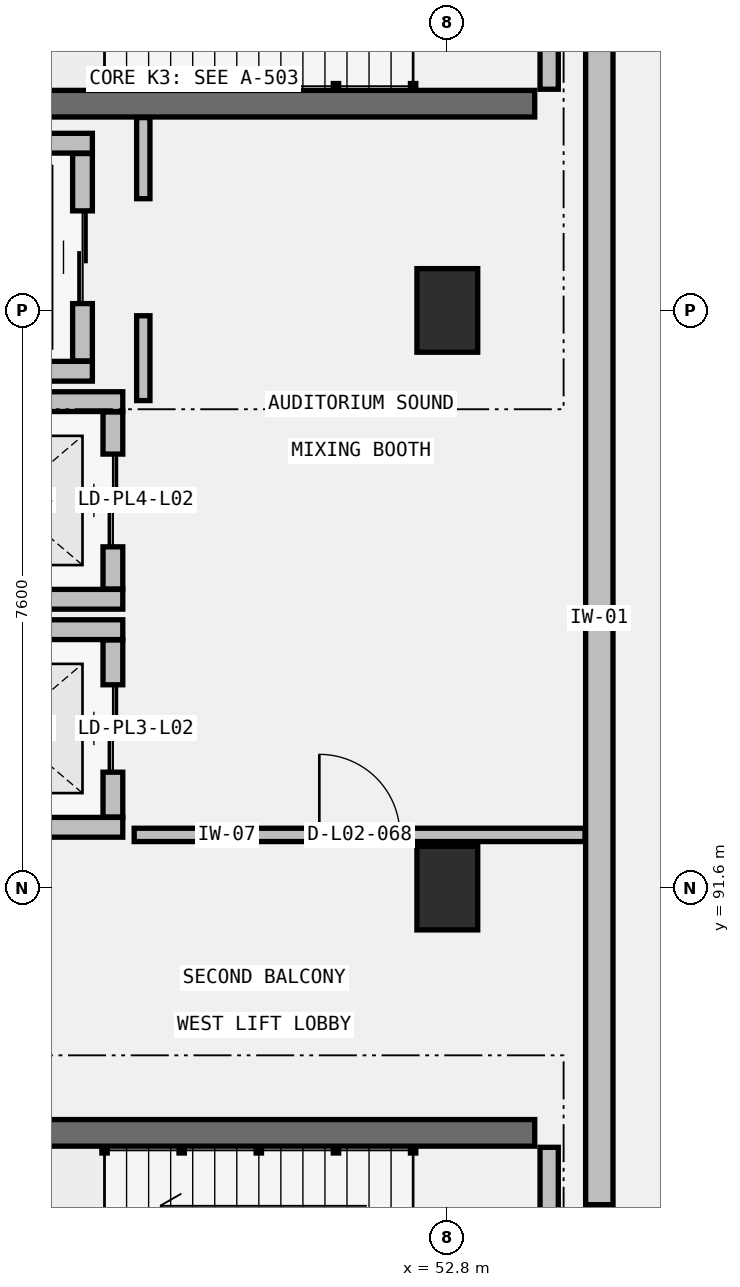
"""IFC4 building model, lengths in metres.
Left out: names, types, materials, properties, quantities, classifications, styles, units other than length and angle.
Written with IfcOpenShell. Run it as: python <this file> out.ifc"""

import sys

from ifc_helpers import new_model, si_unit, direction, frame, frame_2d, origin, origin_2d, place, context, subcontext, project, spatial, rectangle, extrude, element, fill, save


model = new_model("IFC4")
c1 = context("Model", 3, precision=1e-05, world=origin(), true_north=direction((0.0, 1.0)))
c2 = subcontext(c1, "Body", "Model", "MODEL_VIEW")
j1 = project(units=[si_unit("LENGTHUNIT", "METRE"), si_unit("PLANEANGLEUNIT", "RADIAN")], contexts=[c1])
p1 = place(None, origin())
s1 = spatial("IfcSite", under=j1, at=p1, CompositionType="ELEMENT")
p2 = place(p1, origin())
s2 = spatial("IfcBuilding", under=s1, at=p2, CompositionType="ELEMENT")
p3 = place(p2, frame((0.0, 0.0, 10.0)))
s3 = spatial("IfcBuildingStorey", under=s2, at=p3, CompositionType="ELEMENT", Elevation=10.0)
for number, where, z_axis, x_axis in (
    (1, (52.8, 91.6, 0.0), (0.0, 0.0, 1.0), (1.0, 0.0, 0.0)),
    (2, (52.8, 99.2, 0.0), (0.0, 0.0, 1.0), (1.0, 0.0, 0.0)),
):
    element("IfcColumn", number, at=place(p3, frame(where, z_axis=z_axis, x_axis=x_axis)), inside=s3, PredefinedType="COLUMN", context=c2, shape_type="SweptSolid", body=[
        extrude(rectangle(XDim=0.8, YDim=1.1, at=origin_2d()), origin(), (0.0, 0.0, 1.0), 4.6),
    ])
for number, where, z_axis, x_axis in (
    (3, (53.95, 88.38, 0.0), (0.0, 0.0, 1.0), (-1.0, 0.0, 0.0)),
    (4, (45.8, 101.92, 0.0), (0.0, 0.0, 1.0), (1.0, 0.0, 0.0)),
):
    element("IfcWall", number, at=place(p3, frame(where, z_axis=z_axis, x_axis=x_axis)), inside=s3, PredefinedType="SHEAR", context=c2, shape_type="SweptSolid", body=[
        extrude(rectangle(XDim=8.15, YDim=0.35, at=frame_2d((4.075, 0.0))), origin(), (0.0, 0.0, 1.0), 4.36),
    ])
p4 = place(p3, frame((54.14, 88.19, 0.0), z_axis=(0.0, 0.0, 1.0), x_axis=(0.0, -1.0, 0.0)))
e5 = element("IfcWall", 5, at=p4, inside=s3, PredefinedType="STANDARD", context=c2, shape_type="SweptSolid", body=[
    extrude(rectangle(XDim=3.28, YDim=0.24, at=frame_2d((1.64, 0.0))), origin(), (0.0, 0.0, 1.0), 4.36),
])
p5 = place(p4, frame((0.915, 0.0, 0.0)))
e6 = element("IfcOpeningElement", 6, at=p5, cuts=e5, PredefinedType="OPENING", context=c2, shape_type="SweptSolid", body=[
    extrude(rectangle(XDim=1.45, YDim=2.2, at=frame_2d((0.725, 1.1))), frame((0.0, 0.13, 0.0), z_axis=(0.0, -1.0, 0.0), x_axis=(1.0, 0.0, 0.0)), (0.0, 0.0, 1.0), 0.26),
])
p6 = place(p3, frame((54.14, 105.39, 0.0), z_axis=(0.0, 0.0, 1.0), x_axis=(0.0, -1.0, 0.0)))
e7 = element("IfcWall", 7, at=p6, inside=s3, PredefinedType="STANDARD", context=c2, shape_type="SweptSolid", body=[
    extrude(rectangle(XDim=3.28, YDim=0.24, at=frame_2d((1.64, 0.0))), origin(), (0.0, 0.0, 1.0), 4.36),
])
p7 = place(p6, frame((0.915, 0.0, 0.0)))
e8 = element("IfcOpeningElement", 8, at=p7, cuts=e7, PredefinedType="OPENING", context=c2, shape_type="SweptSolid", body=[
    extrude(rectangle(XDim=1.45, YDim=2.2, at=frame_2d((0.725, 1.1))), frame((0.0, 0.13, 0.0), z_axis=(0.0, -1.0, 0.0), x_axis=(1.0, 0.0, 0.0)), (0.0, 0.0, 1.0), 0.26),
])
for number, where, z_axis, x_axis in (
    (9, (45.47, 92.4, 0.0), (0.0, 0.0, 1.0), (1.0, 0.0, 0.0)),
    (10, (45.47, 95.0, 0.0), (0.0, 0.0, 1.0), (1.0, 0.0, 0.0)),
):
    element("IfcWall", number, at=place(p3, frame(where, z_axis=z_axis, x_axis=x_axis)), inside=s3, PredefinedType="STANDARD", context=c2, shape_type="SweptSolid", body=[
        extrude(rectangle(XDim=3.06, YDim=0.26, at=frame_2d((1.53, 0.0))), origin(), (0.0, 0.0, 1.0), 4.36),
    ])
p8 = place(p3, frame((48.4, 92.536, 0.0), z_axis=(0.0, 0.0, 1.0), x_axis=(0.0, 1.0, 0.0)))
e11 = element("IfcWall", 11, at=p8, inside=s3, PredefinedType="STANDARD", context=c2, shape_type="SweptSolid", body=[
    extrude(rectangle(XDim=2.328, YDim=0.26, at=frame_2d((1.164, 0.0))), origin(), (0.0, 0.0, 1.0), 4.36),
])
p9 = place(p8, frame((0.589, 0.0, 0.0)))
e12 = element("IfcOpeningElement", 12, at=p9, cuts=e11, PredefinedType="OPENING", context=c2, shape_type="SweptSolid", body=[
    extrude(rectangle(XDim=1.15, YDim=2.15, at=frame_2d((0.575, 1.075))), frame((0.0, 0.14, 0.0), z_axis=(0.0, -1.0, 0.0), x_axis=(1.0, 0.0, 0.0)), (0.0, 0.0, 1.0), 0.28),
])
for number, where, z_axis, x_axis in (
    (13, (45.47, 95.4, 0.0), (0.0, 0.0, 1.0), (1.0, 0.0, 0.0)),
    (14, (45.47, 98.0, 0.0), (0.0, 0.0, 1.0), (1.0, 0.0, 0.0)),
):
    element("IfcWall", number, at=place(p3, frame(where, z_axis=z_axis, x_axis=x_axis)), inside=s3, PredefinedType="STANDARD", context=c2, shape_type="SweptSolid", body=[
        extrude(rectangle(XDim=3.06, YDim=0.26, at=frame_2d((1.53, 0.0))), origin(), (0.0, 0.0, 1.0), 4.36),
    ])
p10 = place(p3, frame((48.4, 95.536, 0.0), z_axis=(0.0, 0.0, 1.0), x_axis=(0.0, 1.0, 0.0)))
e15 = element("IfcWall", 15, at=p10, inside=s3, PredefinedType="STANDARD", context=c2, shape_type="SweptSolid", body=[
    extrude(rectangle(XDim=2.328, YDim=0.26, at=frame_2d((1.164, 0.0))), origin(), (0.0, 0.0, 1.0), 4.36),
])
p11 = place(p10, frame((0.554, 0.0, 0.0)))
e16 = element("IfcOpeningElement", 16, at=p11, cuts=e15, PredefinedType="OPENING", context=c2, shape_type="SweptSolid", body=[
    extrude(rectangle(XDim=1.22, YDim=2.2, at=frame_2d((0.61, 1.1))), frame((0.0, 0.14, 0.0), z_axis=(0.0, -1.0, 0.0), x_axis=(1.0, 0.0, 0.0)), (0.0, 0.0, 1.0), 0.28),
])
for number, where, z_axis, x_axis in (
    (17, (45.47, 98.4, 0.0), (0.0, 0.0, 1.0), (1.0, 0.0, 0.0)),
    (18, (45.47, 101.4, 0.0), (0.0, 0.0, 1.0), (1.0, 0.0, 0.0)),
):
    element("IfcWall", number, at=place(p3, frame(where, z_axis=z_axis, x_axis=x_axis)), inside=s3, PredefinedType="STANDARD", context=c2, shape_type="SweptSolid", body=[
        extrude(rectangle(XDim=2.66, YDim=0.26, at=frame_2d((1.33, 0.0))), origin(), (0.0, 0.0, 1.0), 4.36),
    ])
p12 = place(p3, frame((48.0, 98.536, 0.0), z_axis=(0.0, 0.0, 1.0), x_axis=(0.0, 1.0, 0.0)))
e19 = element("IfcWall", 19, at=p12, inside=s3, PredefinedType="STANDARD", context=c2, shape_type="SweptSolid", body=[
    extrude(rectangle(XDim=2.728, YDim=0.26, at=frame_2d((1.364, 0.0))), origin(), (0.0, 0.0, 1.0), 4.36),
])
p13 = place(p12, frame((0.754, 0.0, 0.0)))
e20 = element("IfcOpeningElement", 20, at=p13, cuts=e19, PredefinedType="OPENING", context=c2, shape_type="SweptSolid", body=[
    extrude(rectangle(XDim=1.22, YDim=2.2, at=frame_2d((0.61, 1.1))), frame((0.0, 0.14, 0.0), z_axis=(0.0, -1.0, 0.0), x_axis=(1.0, 0.0, 0.0)), (0.0, 0.0, 1.0), 0.28),
])
p14 = place(p3, frame((54.8, 87.435, 0.0), z_axis=(0.0, 0.0, 1.0), x_axis=(0.0, 1.0, 0.0)))
e21 = element("IfcWall", 21, at=p14, inside=s3, PredefinedType="PARTITIONING", context=c2, shape_type="SweptSolid", body=[
    extrude(rectangle(XDim=15.43, YDim=0.36, at=frame_2d((7.715, 0.0))), origin(), (0.0, 0.0, 1.0), 3.638),
])
p15 = place(p3, frame((48.68, 92.3, 0.0), z_axis=(0.0, 0.0, 1.0), x_axis=(1.0, 0.0, 0.0)))
e22 = element("IfcWall", 22, at=p15, inside=s3, PredefinedType="PARTITIONING", context=c2, shape_type="SweptSolid", body=[
    extrude(rectangle(XDim=5.932, YDim=0.175, at=frame_2d((2.966, 0.0))), origin(), (0.0, 0.0, 1.0), 3.75),
])
p16 = place(p15, frame((2.436, 0.0, 0.0)))
e23 = element("IfcOpeningElement", 23, at=p16, cuts=e22, PredefinedType="OPENING", context=c2, shape_type="SweptSolid", body=[
    extrude(rectangle(XDim=1.06, YDim=2.15, at=frame_2d((0.53, 1.075))), frame((0.0, 0.097, 0.0), z_axis=(0.0, -1.0, 0.0), x_axis=(1.0, 0.0, 0.0)), (0.0, 0.0, 1.0), 0.195),
])
p17 = place(p3, frame((48.8, 98.014, 0.0), z_axis=(0.0, 0.0, 1.0), x_axis=(0.0, 1.0, 0.0)))
e24 = element("IfcWall", 24, at=p17, inside=s3, PredefinedType="PARTITIONING", context=c2, shape_type="SweptSolid", body=[
    extrude(rectangle(XDim=1.116, YDim=0.175, at=frame_2d((0.558, 0.0))), origin(), (0.0, 0.0, 1.0), 4.36),
])
p18 = place(p3, frame((48.8, 100.67, 0.0), z_axis=(0.0, 0.0, 1.0), x_axis=(0.0, 1.0, 0.0)))
e25 = element("IfcWall", 25, at=p18, inside=s3, PredefinedType="PARTITIONING", context=c2, shape_type="SweptSolid", body=[
    extrude(rectangle(XDim=1.067, YDim=0.175, at=frame_2d((0.534, 0.0))), origin(), (0.0, 0.0, 1.0), 4.36),
])
p19 = place(p9, origin())
e26 = element("IfcDoor", 26, at=p19, inside=s3, OperationType="SLIDING_TO_LEFT", PredefinedType="DOOR", context=c2, shape_type="SweptSolid", body=[
    extrude(rectangle(XDim=1.15, YDim=2.15, at=frame_2d((0.575, 1.075))), frame((0.0, 0.025, 0.0), z_axis=(0.0, -1.0, 0.0), x_axis=(1.0, 0.0, 0.0)), (0.0, 0.0, 1.0), 0.05),
])
fill(e12, e26)
p20 = place(p11, origin())
e27 = element("IfcDoor", 27, at=p20, inside=s3, OperationType="SLIDING_TO_RIGHT", PredefinedType="DOOR", context=c2, shape_type="SweptSolid", body=[
    extrude(rectangle(XDim=1.22, YDim=2.2, at=frame_2d((0.61, 1.1))), frame((0.0, 0.025, 0.0), z_axis=(0.0, -1.0, 0.0), x_axis=(1.0, 0.0, 0.0)), (0.0, 0.0, 1.0), 0.05),
])
fill(e16, e27)
p21 = place(p13, origin())
e28 = element("IfcDoor", 28, at=p21, inside=s3, OperationType="SLIDING_TO_LEFT", PredefinedType="DOOR", context=c2, shape_type="SweptSolid", body=[
    extrude(rectangle(XDim=1.22, YDim=2.2, at=frame_2d((0.61, 1.1))), frame((0.0, 0.025, 0.0), z_axis=(0.0, -1.0, 0.0), x_axis=(1.0, 0.0, 0.0)), (0.0, 0.0, 1.0), 0.05),
])
fill(e20, e28)
p22 = place(p16, origin())
e29 = element("IfcDoor", 29, at=p22, inside=s3, OperationType="SINGLE_SWING_LEFT", PredefinedType="DOOR", context=c2, shape_type="SweptSolid", body=[
    extrude(rectangle(XDim=1.06, YDim=2.15, at=frame_2d((0.53, 1.075))), frame((0.0, 0.025, 0.0), z_axis=(0.0, -1.0, 0.0), x_axis=(1.0, 0.0, 0.0)), (0.0, 0.0, 1.0), 0.05),
])
fill(e23, e29)
save(model, sys.argv[1])
